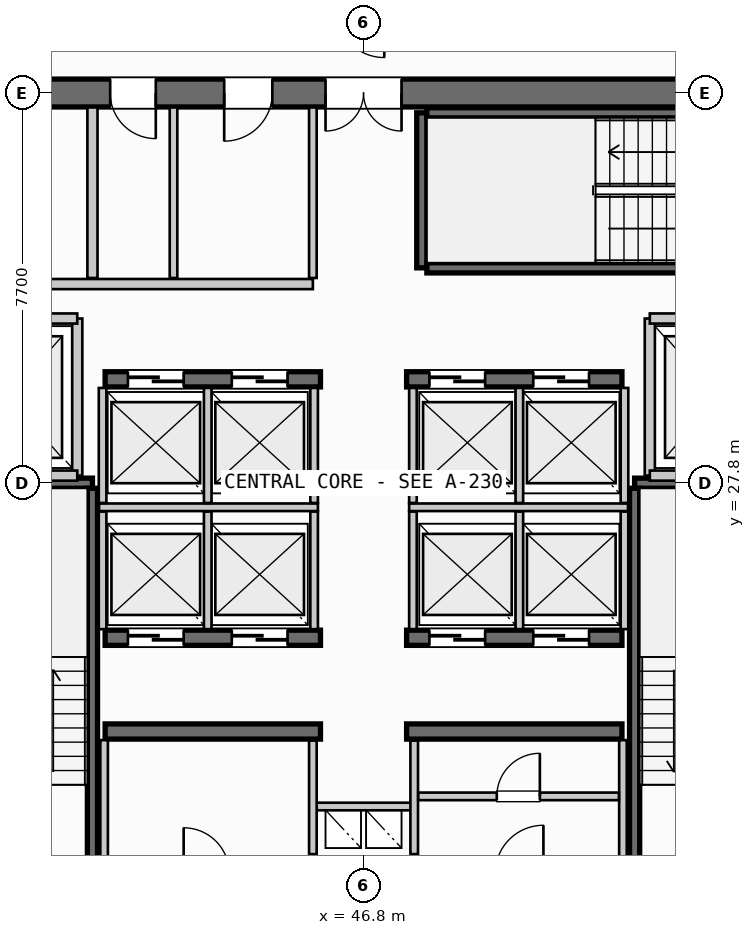
"""IFC4 building model, lengths in metres.
Left out: names, types, materials, properties, quantities, classifications, styles, units other than length and angle.
Written with IfcOpenShell. Run it as: python <this file> out.ifc"""

import sys

from ifc_helpers import new_model, si_unit, direction, frame, frame_2d, origin, place, context, subcontext, project, spatial, rectangle, extrude, source, transform, mapped, element, fill, save


model = new_model("IFC4")
c1 = context("Model", 3, precision=1e-05, world=origin(), true_north=direction((0.0, 1.0)))
c2 = subcontext(c1, "Body", "Model", "MODEL_VIEW")
j1 = project(units=[si_unit("LENGTHUNIT", "METRE"), si_unit("PLANEANGLEUNIT", "RADIAN")], contexts=[c1])
p1 = place(None, origin())
s1 = spatial("IfcSite", under=j1, at=p1, CompositionType="ELEMENT")
p2 = place(p1, origin())
s2 = spatial("IfcBuilding", under=s1, at=p2, CompositionType="ELEMENT")
p3 = place(p2, frame((0.0, 0.0, 214.9)))
s3 = spatial("IfcBuildingStorey", under=s2, at=p3, CompositionType="ELEMENT", Elevation=214.9)
p4 = place(p3, frame((55.6, 35.5, 0.0), z_axis=(0.0, 0.0, 1.0), x_axis=(-1.0, 0.0, 0.0)))
e1 = element("IfcWall", 1, at=p4, inside=s3, PredefinedType="SHEAR", context=c2, shape_type="SweptSolid", body=[
    extrude(rectangle(XDim=17.6, YDim=0.55, at=frame_2d((8.8, 0.0))), origin(), (0.0, 0.0, 1.0), 3.24),
])
p5 = place(p4, frame((8.05, 0.0, 0.0)))
e2 = element("IfcOpeningElement", 2, at=p5, cuts=e1, PredefinedType="OPENING", context=c2, shape_type="SweptSolid", body=[
    extrude(rectangle(XDim=1.5, YDim=2.2, at=frame_2d((0.75, 1.1))), frame((0.0, 0.285, 0.0), z_axis=(0.0, -1.0, 0.0), x_axis=(1.0, 0.0, 0.0)), (0.0, 0.0, 1.0), 0.57),
])
p6 = place(p4, frame((15.1, 0.0, 0.0)))
e3 = element("IfcOpeningElement", 3, at=p6, cuts=e1, PredefinedType="OPENING", context=c2, shape_type="SweptSolid", body=[
    extrude(rectangle(XDim=0.95, YDim=2.15, at=frame_2d((0.475, 1.075))), frame((0.0, 0.285, 0.0), z_axis=(0.0, -1.0, 0.0), x_axis=(1.0, 0.0, 0.0)), (0.0, 0.0, 1.0), 0.57),
])
p7 = place(p4, frame((12.9, 0.0, 0.0)))
e4 = element("IfcOpeningElement", 4, at=p7, cuts=e1, PredefinedType="OPENING", context=c2, shape_type="SweptSolid", body=[
    extrude(rectangle(XDim=0.9, YDim=2.15, at=frame_2d((0.45, 1.075))), frame((0.0, 0.285, 0.0), z_axis=(0.0, -1.0, 0.0), x_axis=(1.0, 0.0, 0.0)), (0.0, 0.0, 1.0), 0.57),
])
p8 = place(p4, frame((10.6, 0.0, 0.0)))
e5 = element("IfcOpeningElement", 5, at=p8, cuts=e1, PredefinedType="OPENING", context=c2, shape_type="SweptSolid", body=[
    extrude(rectangle(XDim=0.95, YDim=2.15, at=frame_2d((0.475, 1.075))), frame((0.0, 0.285, 0.0), z_axis=(0.0, -1.0, 0.0), x_axis=(1.0, 0.0, 0.0)), (0.0, 0.0, 1.0), 0.57),
])
for number, where, z_axis, x_axis in (
    (6, (41.7, 22.9, 0.0), (0.0, 0.0, 1.0), (1.0, 0.0, 0.0)),
    (7, (47.65, 22.9, 0.0), (0.0, 0.0, 1.0), (1.0, 0.0, 0.0)),
):
    element("IfcWall", number, at=place(p3, frame(where, z_axis=z_axis, x_axis=x_axis)), inside=s3, PredefinedType="SHEAR", context=c2, shape_type="SweptSolid", body=[
        extrude(rectangle(XDim=4.25, YDim=0.3, at=frame_2d((2.125, 0.0))), origin(), (0.0, 0.0, 1.0), 3.24),
    ])
p9 = place(p3, frame((41.7, 24.75, 0.0), z_axis=(0.0, 0.0, 1.0), x_axis=(1.0, 0.0, 0.0)))
e8 = element("IfcWall", 8, at=p9, inside=s3, PredefinedType="SHEAR", context=c2, shape_type="SweptSolid", body=[
    extrude(rectangle(XDim=4.25, YDim=0.3, at=frame_2d((2.125, 0.0))), origin(), (0.0, 0.0, 1.0), 3.24),
])
p10 = place(p9, frame((0.45, 0.0, 0.0)))
e9 = element("IfcOpeningElement", 9, at=p10, cuts=e8, PredefinedType="OPENING", context=c2, shape_type="SweptSolid", body=[
    extrude(rectangle(XDim=1.1, YDim=2.2, at=frame_2d((0.55, 1.1))), frame((0.0, 0.16, 0.0), z_axis=(0.0, -1.0, 0.0), x_axis=(1.0, 0.0, 0.0)), (0.0, 0.0, 1.0), 0.32),
])
p11 = place(p9, frame((2.5, 0.0, 0.0)))
e10 = element("IfcOpeningElement", 10, at=p11, cuts=e8, PredefinedType="OPENING", context=c2, shape_type="SweptSolid", body=[
    extrude(rectangle(XDim=1.1, YDim=2.2, at=frame_2d((0.55, 1.1))), frame((0.0, 0.16, 0.0), z_axis=(0.0, -1.0, 0.0), x_axis=(1.0, 0.0, 0.0)), (0.0, 0.0, 1.0), 0.32),
])
p12 = place(p3, frame((47.65, 24.75, 0.0), z_axis=(0.0, 0.0, 1.0), x_axis=(1.0, 0.0, 0.0)))
e11 = element("IfcWall", 11, at=p12, inside=s3, PredefinedType="SHEAR", context=c2, shape_type="SweptSolid", body=[
    extrude(rectangle(XDim=4.25, YDim=0.3, at=frame_2d((2.125, 0.0))), origin(), (0.0, 0.0, 1.0), 3.24),
])
p13 = place(p12, frame((0.45, 0.0, 0.0)))
e12 = element("IfcOpeningElement", 12, at=p13, cuts=e11, PredefinedType="OPENING", context=c2, shape_type="SweptSolid", body=[
    extrude(rectangle(XDim=1.1, YDim=2.2, at=frame_2d((0.55, 1.1))), frame((0.0, 0.16, 0.0), z_axis=(0.0, -1.0, 0.0), x_axis=(1.0, 0.0, 0.0)), (0.0, 0.0, 1.0), 0.32),
])
p14 = place(p12, frame((2.5, 0.0, 0.0)))
e13 = element("IfcOpeningElement", 13, at=p14, cuts=e11, PredefinedType="OPENING", context=c2, shape_type="SweptSolid", body=[
    extrude(rectangle(XDim=1.1, YDim=2.2, at=frame_2d((0.55, 1.1))), frame((0.0, 0.16, 0.0), z_axis=(0.0, -1.0, 0.0), x_axis=(1.0, 0.0, 0.0)), (0.0, 0.0, 1.0), 0.32),
])
p15 = place(p3, frame((41.7, 29.85, 0.0), z_axis=(0.0, 0.0, 1.0), x_axis=(1.0, 0.0, 0.0)))
e14 = element("IfcWall", 14, at=p15, inside=s3, PredefinedType="SHEAR", context=c2, shape_type="SweptSolid", body=[
    extrude(rectangle(XDim=4.25, YDim=0.3, at=frame_2d((2.125, 0.0))), origin(), (0.0, 0.0, 1.0), 3.24),
])
p16 = place(p15, frame((0.45, 0.0, 0.0)))
e15 = element("IfcOpeningElement", 15, at=p16, cuts=e14, PredefinedType="OPENING", context=c2, shape_type="SweptSolid", body=[
    extrude(rectangle(XDim=1.1, YDim=2.2, at=frame_2d((0.55, 1.1))), frame((0.0, 0.16, 0.0), z_axis=(0.0, -1.0, 0.0), x_axis=(1.0, 0.0, 0.0)), (0.0, 0.0, 1.0), 0.32),
])
p17 = place(p15, frame((2.5, 0.0, 0.0)))
e16 = element("IfcOpeningElement", 16, at=p17, cuts=e14, PredefinedType="OPENING", context=c2, shape_type="SweptSolid", body=[
    extrude(rectangle(XDim=1.1, YDim=2.2, at=frame_2d((0.55, 1.1))), frame((0.0, 0.16, 0.0), z_axis=(0.0, -1.0, 0.0), x_axis=(1.0, 0.0, 0.0)), (0.0, 0.0, 1.0), 0.32),
])
p18 = place(p3, frame((47.65, 29.85, 0.0), z_axis=(0.0, 0.0, 1.0), x_axis=(1.0, 0.0, 0.0)))
e17 = element("IfcWall", 17, at=p18, inside=s3, PredefinedType="SHEAR", context=c2, shape_type="SweptSolid", body=[
    extrude(rectangle(XDim=4.25, YDim=0.3, at=frame_2d((2.125, 0.0))), origin(), (0.0, 0.0, 1.0), 3.24),
])
p19 = place(p18, frame((0.45, 0.0, 0.0)))
e18 = element("IfcOpeningElement", 18, at=p19, cuts=e17, PredefinedType="OPENING", context=c2, shape_type="SweptSolid", body=[
    extrude(rectangle(XDim=1.1, YDim=2.2, at=frame_2d((0.55, 1.1))), frame((0.0, 0.16, 0.0), z_axis=(0.0, -1.0, 0.0), x_axis=(1.0, 0.0, 0.0)), (0.0, 0.0, 1.0), 0.32),
])
p20 = place(p18, frame((2.5, 0.0, 0.0)))
e19 = element("IfcOpeningElement", 19, at=p20, cuts=e17, PredefinedType="OPENING", context=c2, shape_type="SweptSolid", body=[
    extrude(rectangle(XDim=1.1, YDim=2.2, at=frame_2d((0.55, 1.1))), frame((0.0, 0.16, 0.0), z_axis=(0.0, -1.0, 0.0), x_axis=(1.0, 0.0, 0.0)), (0.0, 0.0, 1.0), 0.32),
])
p21 = place(p3, frame((38.39, 27.8, 0.0), z_axis=(0.0, 0.0, 1.0), x_axis=(1.0, 0.0, 0.0)))
e20 = element("IfcWall", 20, at=p21, inside=s3, PredefinedType="SHEAR", context=c2, shape_type="SweptSolid", body=[
    extrude(rectangle(XDim=3.06, YDim=0.2, at=frame_2d((1.53, 0.0))), origin(), (0.0, 0.0, 1.0), 3.24),
])
p22 = place(p3, frame((41.45, 27.7, 0.0), z_axis=(0.0, 0.0, 1.0), x_axis=(0.0, -1.0, 0.0)))
e21 = element("IfcWall", 21, at=p22, inside=s3, PredefinedType="SHEAR", context=c2, shape_type="SweptSolid", body=[
    extrude(rectangle(XDim=7.35, YDim=0.2, at=frame_2d((3.675, 0.0))), origin(), (0.0, 0.0, 1.0), 3.24),
])
p23 = place(p3, frame((52.15, 27.8, 0.0), z_axis=(0.0, 0.0, 1.0), x_axis=(1.0, 0.0, 0.0)))
e22 = element("IfcWall", 22, at=p23, inside=s3, PredefinedType="SHEAR", context=c2, shape_type="SweptSolid", body=[
    extrude(rectangle(XDim=3.06, YDim=0.2, at=frame_2d((1.53, 0.0))), origin(), (0.0, 0.0, 1.0), 3.24),
])
p24 = place(p3, frame((52.15, 20.35, 0.0), z_axis=(0.0, 0.0, 1.0), x_axis=(0.0, 1.0, 0.0)))
e23 = element("IfcWall", 23, at=p24, inside=s3, PredefinedType="SHEAR", context=c2, shape_type="SweptSolid", body=[
    extrude(rectangle(XDim=7.35, YDim=0.2, at=frame_2d((3.675, 0.0))), origin(), (0.0, 0.0, 1.0), 3.24),
])
p25 = place(p3, frame((47.95, 32.05, 0.0), z_axis=(0.0, 0.0, 1.0), x_axis=(0.0, 1.0, 0.0)))
e24 = element("IfcWall", 24, at=p25, inside=s3, PredefinedType="SHEAR", context=c2, shape_type="SweptSolid", body=[
    extrude(rectangle(XDim=3.06, YDim=0.2, at=frame_2d((1.53, 0.0))), origin(), (0.0, 0.0, 1.0), 3.24),
])
for number, where, z_axis, x_axis in (
    (25, (48.05, 35.11, 0.0), (0.0, 0.0, 1.0), (1.0, 0.0, 0.0)),
    (26, (55.4, 32.05, 0.0), (0.0, 0.0, 1.0), (-1.0, 0.0, 0.0)),
):
    element("IfcWall", number, at=place(p3, frame(where, z_axis=z_axis, x_axis=x_axis)), inside=s3, PredefinedType="SHEAR", context=c2, shape_type="SweptSolid", body=[
        extrude(rectangle(XDim=7.35, YDim=0.2, at=frame_2d((3.675, 0.0))), origin(), (0.0, 0.0, 1.0), 3.24),
    ])
p26 = place(p3, frame((45.8, 21.42, 0.0), z_axis=(0.0, 0.0, 1.0), x_axis=(1.0, 0.0, 0.0)))
e27 = element("IfcWall", 27, at=p26, inside=s3, PredefinedType="PARTITIONING", context=c2, shape_type="SweptSolid", body=[
    extrude(rectangle(XDim=2.0, YDim=0.15, at=frame_2d((1.0, 0.0))), origin(), (0.0, 0.0, 1.0), 2.295),
])
for number, where, z_axis, x_axis in (
    (28, (45.8, 20.48, 0.0), (0.0, 0.0, 1.0), (0.0, 1.0, 0.0)),
    (29, (47.8, 20.48, 0.0), (0.0, 0.0, 1.0), (0.0, 1.0, 0.0)),
):
    element("IfcWall", number, at=place(p3, frame(where, z_axis=z_axis, x_axis=x_axis)), inside=s3, PredefinedType="PARTITIONING", context=c2, shape_type="SweptSolid", body=[
        extrude(rectangle(XDim=2.24, YDim=0.15, at=frame_2d((1.12, 0.0))), origin(), (0.0, 0.0, 1.0), 2.295),
    ])
p27 = place(p3, frame((41.15, 27.95, 0.0), z_axis=(0.0, 0.0, 1.0), x_axis=(0.0, 1.0, 0.0)))
e30 = element("IfcWall", 30, at=p27, inside=s3, PredefinedType="PARTITIONING", context=c2, shape_type="SweptSolid", body=[
    extrude(rectangle(XDim=3.1, YDim=0.2, at=frame_2d((1.55, 0.0))), origin(), (0.0, 0.0, 1.0), 2.295),
])
for number, where, z_axis, x_axis in (
    (31, (38.285, 27.95, 0.0), (0.0, 0.0, 1.0), (1.0, 0.0, 0.0)),
    (32, (38.285, 31.05, 0.0), (0.0, 0.0, 1.0), (1.0, 0.0, 0.0)),
):
    element("IfcWall", number, at=place(p3, frame(where, z_axis=z_axis, x_axis=x_axis)), inside=s3, PredefinedType="PARTITIONING", context=c2, shape_type="SweptSolid", body=[
        extrude(rectangle(XDim=2.865, YDim=0.2, at=frame_2d((1.433, 0.0))), origin(), (0.0, 0.0, 1.0), 2.295),
    ])
p28 = place(p3, frame((52.45, 27.95, 0.0), z_axis=(0.0, 0.0, 1.0), x_axis=(0.0, 1.0, 0.0)))
e33 = element("IfcWall", 33, at=p28, inside=s3, PredefinedType="PARTITIONING", context=c2, shape_type="SweptSolid", body=[
    extrude(rectangle(XDim=3.1, YDim=0.2, at=frame_2d((1.55, 0.0))), origin(), (0.0, 0.0, 1.0), 2.295),
])
for number, where, z_axis, x_axis in (
    (34, (52.45, 27.95, 0.0), (0.0, 0.0, 1.0), (1.0, 0.0, 0.0)),
    (35, (52.45, 31.05, 0.0), (0.0, 0.0, 1.0), (1.0, 0.0, 0.0)),
):
    element("IfcWall", number, at=place(p3, frame(where, z_axis=z_axis, x_axis=x_axis)), inside=s3, PredefinedType="PARTITIONING", context=c2, shape_type="SweptSolid", body=[
        extrude(rectangle(XDim=2.865, YDim=0.2, at=frame_2d((1.433, 0.0))), origin(), (0.0, 0.0, 1.0), 2.295),
    ])
for number, where, z_axis, x_axis in (
    (36, (41.68, 20.385, 0.0), (0.0, 0.0, 1.0), (0.0, 1.0, 0.0)),
    (37, (51.92, 20.385, 0.0), (0.0, 0.0, 1.0), (0.0, 1.0, 0.0)),
):
    element("IfcWall", number, at=place(p3, frame(where, z_axis=z_axis, x_axis=x_axis)), inside=s3, PredefinedType="PARTITIONING", context=c2, shape_type="SweptSolid", body=[
        extrude(rectangle(XDim=2.345, YDim=0.15, at=frame_2d((1.172, 0.0))), origin(), (0.0, 0.0, 1.0), 2.295),
    ])
p29 = place(p3, frame((47.88, 21.62, 0.0), z_axis=(0.0, 0.0, 1.0), x_axis=(1.0, 0.0, 0.0)))
e38 = element("IfcWall", 38, at=p29, inside=s3, PredefinedType="PARTITIONING", context=c2, shape_type="SweptSolid", body=[
    extrude(rectangle(XDim=3.96, YDim=0.15, at=frame_2d((1.98, 0.0))), origin(), (0.0, 0.0, 1.0), 2.295),
])
p30 = place(p29, frame((1.55, 0.0, 0.0)))
e39 = element("IfcOpeningElement", 39, at=p30, cuts=e38, PredefinedType="OPENING", context=c2, shape_type="SweptSolid", body=[
    extrude(rectangle(XDim=0.85, YDim=2.15, at=frame_2d((0.425, 1.075))), frame((0.0, 0.085, 0.0), z_axis=(0.0, -1.0, 0.0), x_axis=(1.0, 0.0, 0.0)), (0.0, 0.0, 1.0), 0.17),
])
p31 = place(p3, frame((41.58, 27.325, 0.0), z_axis=(0.0, 0.0, 1.0), x_axis=(1.0, 0.0, 0.0)))
e40 = element("IfcWall", 40, at=p31, inside=s3, PredefinedType="PARTITIONING", context=c2, shape_type="SweptSolid", body=[
    extrude(rectangle(XDim=4.32, YDim=0.15, at=frame_2d((2.16, 0.0))), origin(), (0.0, 0.0, 1.0), 2.295),
])
p32 = place(p3, frame((47.7, 27.325, 0.0), z_axis=(0.0, 0.0, 1.0), x_axis=(1.0, 0.0, 0.0)))
e41 = element("IfcWall", 41, at=p32, inside=s3, PredefinedType="PARTITIONING", context=c2, shape_type="SweptSolid", body=[
    extrude(rectangle(XDim=4.32, YDim=0.15, at=frame_2d((2.16, 0.0))), origin(), (0.0, 0.0, 1.0), 2.295),
])
for number, where, z_axis, x_axis in (
    (42, (41.65, 24.92, 0.0), (0.0, 0.0, 1.0), (0.0, 1.0, 0.0)),
    (43, (43.725, 24.92, 0.0), (0.0, 0.0, 1.0), (0.0, 1.0, 0.0)),
    (44, (45.825, 24.92, 0.0), (0.0, 0.0, 1.0), (0.0, 1.0, 0.0)),
    (45, (47.775, 24.92, 0.0), (0.0, 0.0, 1.0), (0.0, 1.0, 0.0)),
    (46, (49.875, 24.92, 0.0), (0.0, 0.0, 1.0), (0.0, 1.0, 0.0)),
    (47, (51.95, 24.92, 0.0), (0.0, 0.0, 1.0), (0.0, 1.0, 0.0)),
):
    element("IfcWall", number, at=place(p3, frame(where, z_axis=z_axis, x_axis=x_axis)), inside=s3, PredefinedType="PARTITIONING", context=c2, shape_type="SweptSolid", body=[
        extrude(rectangle(XDim=2.32, YDim=0.15, at=frame_2d((1.16, 0.0))), origin(), (0.0, 0.0, 1.0), 2.295),
    ])
for number, where, z_axis, x_axis in (
    (48, (41.65, 27.41, 0.0), (0.0, 0.0, 1.0), (0.0, 1.0, 0.0)),
    (49, (43.725, 27.41, 0.0), (0.0, 0.0, 1.0), (0.0, 1.0, 0.0)),
    (50, (45.825, 27.41, 0.0), (0.0, 0.0, 1.0), (0.0, 1.0, 0.0)),
    (51, (47.775, 27.41, 0.0), (0.0, 0.0, 1.0), (0.0, 1.0, 0.0)),
    (52, (49.875, 27.41, 0.0), (0.0, 0.0, 1.0), (0.0, 1.0, 0.0)),
    (53, (51.95, 27.41, 0.0), (0.0, 0.0, 1.0), (0.0, 1.0, 0.0)),
):
    element("IfcWall", number, at=place(p3, frame(where, z_axis=z_axis, x_axis=x_axis)), inside=s3, PredefinedType="PARTITIONING", context=c2, shape_type="SweptSolid", body=[
        extrude(rectangle(XDim=2.27, YDim=0.15, at=frame_2d((1.135, 0.0))), origin(), (0.0, 0.0, 1.0), 2.295),
    ])
p33 = place(p3, frame((41.45, 31.85, 0.0), z_axis=(0.0, 0.0, 1.0), x_axis=(0.0, 1.0, 0.0)))
e54 = element("IfcWall", 54, at=p33, inside=s3, PredefinedType="PARTITIONING", context=c2, shape_type="SweptSolid", body=[
    extrude(rectangle(XDim=3.365, YDim=0.2, at=frame_2d((1.683, 0.0))), origin(), (0.0, 0.0, 1.0), 2.295),
])
p34 = place(p3, frame((38.285, 31.73, 0.0), z_axis=(0.0, 0.0, 1.0), x_axis=(1.0, 0.0, 0.0)))
e55 = element("IfcWall", 55, at=p34, inside=s3, PredefinedType="PARTITIONING", context=c2, shape_type="SweptSolid", body=[
    extrude(rectangle(XDim=7.515, YDim=0.2, at=frame_2d((3.758, 0.0))), origin(), (0.0, 0.0, 1.0), 2.295),
])
p35 = place(p3, frame((45.8, 31.85, 0.0), z_axis=(0.0, 0.0, 1.0), x_axis=(0.0, 1.0, 0.0)))
e56 = element("IfcWall", 56, at=p35, inside=s3, PredefinedType="PARTITIONING", context=c2, shape_type="SweptSolid", body=[
    extrude(rectangle(XDim=3.365, YDim=0.15, at=frame_2d((1.683, 0.0))), origin(), (0.0, 0.0, 1.0), 2.295),
])
p36 = place(p3, frame((43.05, 31.85, 0.0), z_axis=(0.0, 0.0, 1.0), x_axis=(0.0, 1.0, 0.0)))
e57 = element("IfcWall", 57, at=p36, inside=s3, PredefinedType="PLUMBINGWALL", context=c2, shape_type="SweptSolid", body=[
    extrude(rectangle(XDim=3.365, YDim=0.15, at=frame_2d((1.683, 0.0))), origin(), (0.0, 0.0, 1.0), 2.295),
])
m1 = source(origin(), c2, "Body", "SweptSolid", [
    extrude(rectangle(XDim=1.5, YDim=2.2, at=frame_2d((0.75, 1.1))), frame((0.0, 0.025, 0.0), z_axis=(0.0, -1.0, 0.0), x_axis=(1.0, 0.0, 0.0)), (0.0, 0.0, 1.0), 0.05),
])
p37 = place(p5, origin())
e58 = element("IfcDoor", 58, at=p37, inside=s3, OperationType="DOUBLE_DOOR_SINGLE_SWING", PredefinedType="DOOR", context=c2, shape_type="MappedRepresentation", body=[
    mapped(m1, transform((0.0, 0.0, 0.0), scale=1.0)),
])
fill(e2, e58)
m2 = source(origin(), c2, "Body", "SweptSolid", [
    extrude(rectangle(XDim=1.1, YDim=2.2, at=frame_2d((0.55, 1.1))), frame((0.0, 0.025, 0.0), z_axis=(0.0, -1.0, 0.0), x_axis=(1.0, 0.0, 0.0)), (0.0, 0.0, 1.0), 0.05),
])
p38 = place(p10, origin())
e59 = element("IfcDoor", 59, at=p38, inside=s3, OperationType="SLIDING_TO_RIGHT", PredefinedType="DOOR", context=c2, shape_type="MappedRepresentation", body=[
    mapped(m2, transform((0.0, 0.0, 0.0), scale=1.0)),
])
fill(e9, e59)
p39 = place(p11, origin())
e60 = element("IfcDoor", 60, at=p39, inside=s3, OperationType="SLIDING_TO_RIGHT", PredefinedType="DOOR", context=c2, shape_type="MappedRepresentation", body=[
    mapped(m2, transform((0.0, 0.0, 0.0), scale=1.0)),
])
fill(e10, e60)
p40 = place(p13, origin())
e61 = element("IfcDoor", 61, at=p40, inside=s3, OperationType="SLIDING_TO_RIGHT", PredefinedType="DOOR", context=c2, shape_type="MappedRepresentation", body=[
    mapped(m2, transform((0.0, 0.0, 0.0), scale=1.0)),
])
fill(e12, e61)
p41 = place(p14, origin())
e62 = element("IfcDoor", 62, at=p41, inside=s3, OperationType="SLIDING_TO_RIGHT", PredefinedType="DOOR", context=c2, shape_type="MappedRepresentation", body=[
    mapped(m2, transform((0.0, 0.0, 0.0), scale=1.0)),
])
fill(e13, e62)
p42 = place(p16, origin())
e63 = element("IfcDoor", 63, at=p42, inside=s3, OperationType="SLIDING_TO_LEFT", PredefinedType="DOOR", context=c2, shape_type="MappedRepresentation", body=[
    mapped(m2, transform((0.0, 0.0, 0.0), scale=1.0)),
])
fill(e15, e63)
p43 = place(p17, origin())
e64 = element("IfcDoor", 64, at=p43, inside=s3, OperationType="SLIDING_TO_LEFT", PredefinedType="DOOR", context=c2, shape_type="MappedRepresentation", body=[
    mapped(m2, transform((0.0, 0.0, 0.0), scale=1.0)),
])
fill(e16, e64)
p44 = place(p19, origin())
e65 = element("IfcDoor", 65, at=p44, inside=s3, OperationType="SLIDING_TO_LEFT", PredefinedType="DOOR", context=c2, shape_type="MappedRepresentation", body=[
    mapped(m2, transform((0.0, 0.0, 0.0), scale=1.0)),
])
fill(e18, e65)
p45 = place(p20, origin())
e66 = element("IfcDoor", 66, at=p45, inside=s3, OperationType="SLIDING_TO_LEFT", PredefinedType="DOOR", context=c2, shape_type="MappedRepresentation", body=[
    mapped(m2, transform((0.0, 0.0, 0.0), scale=1.0)),
])
fill(e19, e66)
m3 = source(origin(), c2, "Body", "SweptSolid", [
    extrude(rectangle(XDim=0.9, YDim=2.15, at=frame_2d((0.45, 1.075))), frame((0.0, 0.025, 0.0), z_axis=(0.0, -1.0, 0.0), x_axis=(1.0, 0.0, 0.0)), (0.0, 0.0, 1.0), 0.05),
])
p46 = place(p7, origin())
e67 = element("IfcDoor", 67, at=p46, inside=s3, OperationType="SINGLE_SWING_LEFT", PredefinedType="DOOR", context=c2, shape_type="MappedRepresentation", body=[
    mapped(m3, transform((0.0, 0.0, 0.0), scale=1.0)),
])
fill(e4, e67)
m4 = source(origin(), c2, "Body", "SweptSolid", [
    extrude(rectangle(XDim=0.95, YDim=2.15, at=frame_2d((0.475, 1.075))), frame((0.0, 0.025, 0.0), z_axis=(0.0, -1.0, 0.0), x_axis=(1.0, 0.0, 0.0)), (0.0, 0.0, 1.0), 0.05),
])
p47 = place(p8, origin())
e68 = element("IfcDoor", 68, at=p47, inside=s3, OperationType="SINGLE_SWING_RIGHT", PredefinedType="DOOR", context=c2, shape_type="MappedRepresentation", body=[
    mapped(m4, transform((0.0, 0.0, 0.0), scale=1.0)),
])
fill(e5, e68)
m5 = source(origin(), c2, "Body", "SweptSolid", [
    extrude(rectangle(XDim=0.85, YDim=2.15, at=frame_2d((0.425, 1.075))), frame((0.0, 0.025, 0.0), z_axis=(0.0, -1.0, 0.0), x_axis=(1.0, 0.0, 0.0)), (0.0, 0.0, 1.0), 0.05),
])
p48 = place(p30, origin())
e69 = element("IfcDoor", 69, at=p48, inside=s3, OperationType="SINGLE_SWING_RIGHT", PredefinedType="DOOR", context=c2, shape_type="MappedRepresentation", body=[
    mapped(m5, transform((0.0, 0.0, 0.0), scale=1.0)),
])
fill(e39, e69)
save(model, sys.argv[1])
